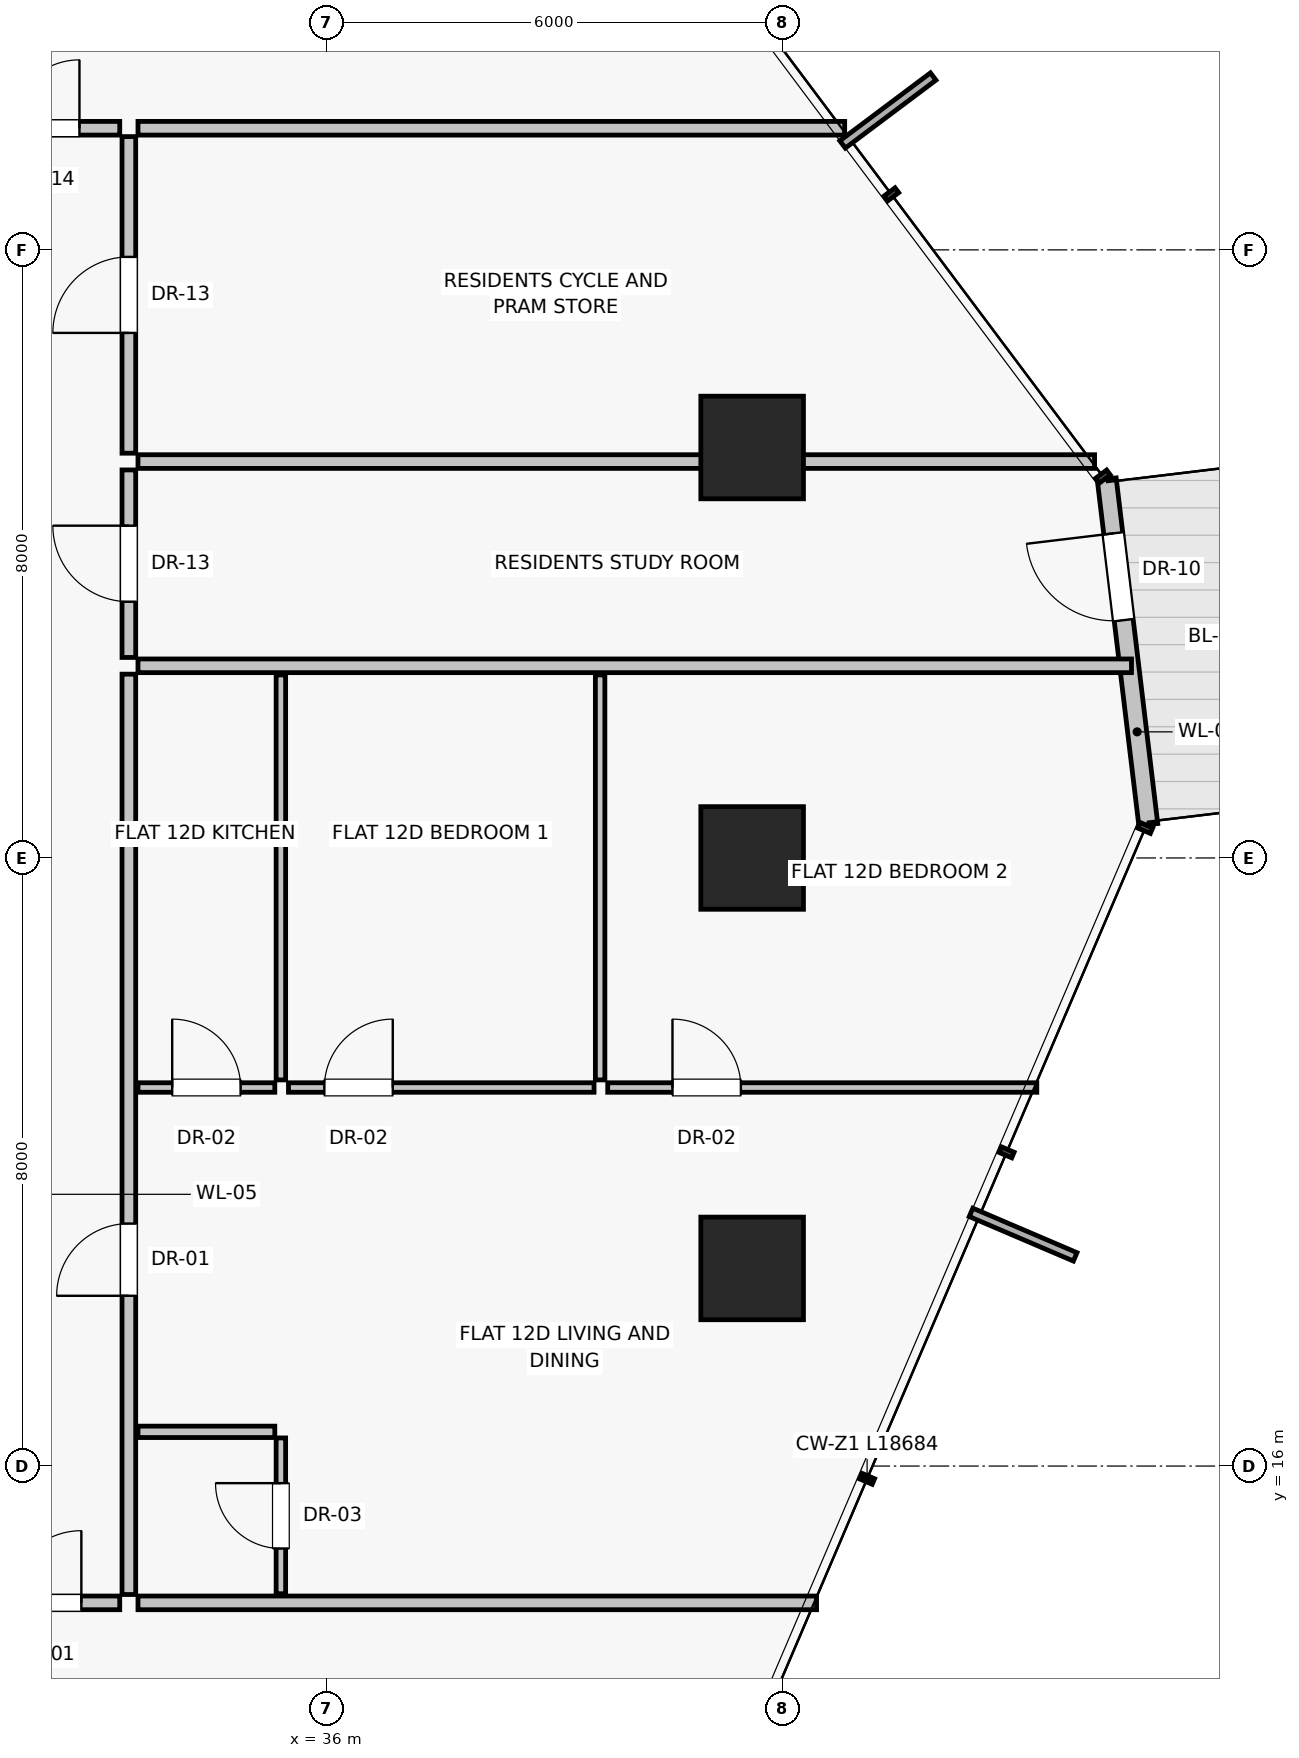
"""IFC4 building model, lengths in metres.
Left out: names, types, materials, properties, quantities, classifications, styles, units other than length and angle.
Written with IfcOpenShell. Run it as: python <this file> out.ifc"""

import sys

from ifc_helpers import new_model, si_unit, direction, frame, frame_2d, origin, origin_2d, place, context, subcontext, project, spatial, rectangle, extrude, source, transform, mapped, element, fill, save


model = new_model("IFC4")
c1 = context("Model", 3, precision=1e-05, world=origin(), true_north=direction((0.0, 1.0)))
c2 = subcontext(c1, "Body", "Model", "MODEL_VIEW")
j1 = project(units=[si_unit("LENGTHUNIT", "METRE"), si_unit("PLANEANGLEUNIT", "RADIAN")], contexts=[c1])
p1 = place(None, origin())
s1 = spatial("IfcSite", under=j1, at=p1, CompositionType="ELEMENT")
p2 = place(p1, origin())
s2 = spatial("IfcBuilding", under=s1, at=p2, CompositionType="ELEMENT")
p3 = place(p2, frame((0.0, 0.0, 46.8)))
s3 = spatial("IfcBuildingStorey", under=s2, at=p3, CompositionType="ELEMENT", Elevation=46.8)
for number, where, z_axis, x_axis in (
    (1, (41.6, 18.6, 0.0), (0.0, 0.0, 1.0), (1.0, 0.0, 0.0)),
    (2, (41.6, 24.0, 0.0), (0.0, 0.0, 1.0), (1.0, 0.0, 0.0)),
    (3, (41.6, 29.4, 0.0), (0.0, 0.0, 1.0), (1.0, 0.0, 0.0)),
):
    element("IfcColumn", number, at=place(p3, frame(where, z_axis=z_axis, x_axis=x_axis)), inside=s3, PredefinedType="COLUMN", context=c2, shape_type="SweptSolid", body=[
        extrude(rectangle(XDim=1.35, YDim=1.35, at=origin_2d()), origin(), (0.0, 0.0, 1.0), 3.25),
    ])
p4 = place(p3, frame((46.812, 24.438, 0.0), z_axis=(0.0, 0.0, 1.0), x_axis=(-0.119460515021, 0.992838952374, 0.0)))
e4 = element("IfcWall", 4, at=p4, inside=s3, PredefinedType="SOLIDWALL", context=c2, shape_type="SweptSolid", body=[
    extrude(rectangle(XDim=4.58, YDim=0.25, at=frame_2d((2.29, 0.0))), origin(), (0.0, 0.0, 1.0), 3.0),
])
p5 = place(p4, frame((2.71, 0.0, 0.0)))
e5 = element("IfcOpeningElement", 5, at=p5, cuts=e4, PredefinedType="OPENING", context=c2, shape_type="SweptSolid", body=[
    extrude(rectangle(XDim=1.15, YDim=2.25, at=frame_2d((0.575, 1.125))), frame((0.0, 0.135, 0.0), z_axis=(0.0, -1.0, 0.0), x_axis=(1.0, 0.0, 0.0)), (0.0, 0.0, 1.0), 0.27),
])
p6 = place(p3, frame((33.52, 14.2, 0.0), z_axis=(0.0, 0.0, 1.0), x_axis=(1.0, 0.0, 0.0)))
e6 = element("IfcWall", 6, at=p6, inside=s3, PredefinedType="PARTITIONING", context=c2, shape_type="SweptSolid", body=[
    extrude(rectangle(XDim=8.927, YDim=0.18, at=frame_2d((4.464, 0.0))), origin(), (0.0, 0.0, 1.0), 3.0),
])
p7 = place(p3, frame((33.52, 33.6, 0.0), z_axis=(0.0, 0.0, 1.0), x_axis=(1.0, 0.0, 0.0)))
e7 = element("IfcWall", 7, at=p7, inside=s3, PredefinedType="PARTITIONING", context=c2, shape_type="SweptSolid", body=[
    extrude(rectangle(XDim=9.297, YDim=0.18, at=frame_2d((4.649, 0.0))), origin(), (0.0, 0.0, 1.0), 3.0),
])
p8 = place(p3, frame((33.4, 14.31, 0.0), z_axis=(0.0, 0.0, 1.0), x_axis=(0.0, 1.0, 0.0)))
e8 = element("IfcWall", 8, at=p8, inside=s3, PredefinedType="PARTITIONING", context=c2, shape_type="SweptSolid", body=[
    extrude(rectangle(XDim=12.108, YDim=0.18, at=frame_2d((6.054, 0.0))), origin(), (0.0, 0.0, 1.0), 3.0),
])
p9 = place(p8, frame((3.93, 0.0, 0.0)))
e9 = element("IfcOpeningElement", 9, at=p9, cuts=e8, PredefinedType="OPENING", context=c2, shape_type="SweptSolid", body=[
    extrude(rectangle(XDim=0.95, YDim=2.02, at=frame_2d((0.475, 1.01))), frame((0.0, 0.1, 0.0), z_axis=(0.0, -1.0, 0.0), x_axis=(1.0, 0.0, 0.0)), (0.0, 0.0, 1.0), 0.2),
])
p10 = place(p3, frame((33.52, 16.45, 0.0), z_axis=(0.0, 0.0, 1.0), x_axis=(1.0, 0.0, 0.0)))
e10 = element("IfcWall", 10, at=p10, inside=s3, PredefinedType="PARTITIONING", context=c2, shape_type="SweptSolid", body=[
    extrude(rectangle(XDim=1.8, YDim=0.15, at=frame_2d((0.9, 0.0))), origin(), (0.0, 0.0, 1.0), 3.0),
])
p11 = place(p3, frame((35.4, 14.32, 0.0), z_axis=(0.0, 0.0, 1.0), x_axis=(0.0, 1.0, 0.0)))
e11 = element("IfcWall", 11, at=p11, inside=s3, PredefinedType="PARTITIONING", context=c2, shape_type="SweptSolid", body=[
    extrude(rectangle(XDim=2.05, YDim=0.125, at=frame_2d((1.025, 0.0))), origin(), (0.0, 0.0, 1.0), 3.0),
])
p12 = place(p11, frame((0.595, 0.0, 0.0)))
e12 = element("IfcOpeningElement", 12, at=p12, cuts=e11, PredefinedType="OPENING", context=c2, shape_type="SweptSolid", body=[
    extrude(rectangle(XDim=0.86, YDim=2.01, at=frame_2d((0.43, 1.005))), frame((0.0, 0.073, 0.0), z_axis=(0.0, -1.0, 0.0), x_axis=(1.0, 0.0, 0.0)), (0.0, 0.0, 1.0), 0.145),
])
p13 = place(p3, frame((33.52, 20.98, 0.0), z_axis=(0.0, 0.0, 1.0), x_axis=(1.0, 0.0, 0.0)))
e13 = element("IfcWall", 13, at=p13, inside=s3, PredefinedType="PARTITIONING", context=c2, shape_type="SweptSolid", body=[
    extrude(rectangle(XDim=1.8, YDim=0.125, at=frame_2d((0.9, 0.0))), origin(), (0.0, 0.0, 1.0), 3.0),
])
p14 = place(p13, frame((0.45, 0.0, 0.0)))
e14 = element("IfcOpeningElement", 14, at=p14, cuts=e13, PredefinedType="OPENING", context=c2, shape_type="SweptSolid", body=[
    extrude(rectangle(XDim=0.9, YDim=2.01, at=frame_2d((0.45, 1.005))), frame((0.0, 0.073, 0.0), z_axis=(0.0, -1.0, 0.0), x_axis=(1.0, 0.0, 0.0)), (0.0, 0.0, 1.0), 0.145),
])
for number, where, z_axis, x_axis in (
    (15, (35.4, 21.08, 0.0), (0.0, 0.0, 1.0), (0.0, 1.0, 0.0)),
    (16, (39.6, 21.08, 0.0), (0.0, 0.0, 1.0), (0.0, 1.0, 0.0)),
):
    element("IfcWall", number, at=place(p3, frame(where, z_axis=z_axis, x_axis=x_axis)), inside=s3, PredefinedType="PARTITIONING", context=c2, shape_type="SweptSolid", body=[
        extrude(rectangle(XDim=5.328, YDim=0.125, at=frame_2d((2.664, 0.0))), origin(), (0.0, 0.0, 1.0), 3.0),
    ])
p15 = place(p3, frame((35.5, 20.98, 0.0), z_axis=(0.0, 0.0, 1.0), x_axis=(1.0, 0.0, 0.0)))
e17 = element("IfcWall", 17, at=p15, inside=s3, PredefinedType="PARTITIONING", context=c2, shape_type="SweptSolid", body=[
    extrude(rectangle(XDim=4.02, YDim=0.125, at=frame_2d((2.01, 0.0))), origin(), (0.0, 0.0, 1.0), 3.0),
])
p16 = place(p15, frame((0.472, 0.0, 0.0)))
e18 = element("IfcOpeningElement", 18, at=p16, cuts=e17, PredefinedType="OPENING", context=c2, shape_type="SweptSolid", body=[
    extrude(rectangle(XDim=0.9, YDim=2.01, at=frame_2d((0.45, 1.005))), frame((0.0, 0.073, 0.0), z_axis=(0.0, -1.0, 0.0), x_axis=(1.0, 0.0, 0.0)), (0.0, 0.0, 1.0), 0.145),
])
p17 = place(p3, frame((39.7, 20.98, 0.0), z_axis=(0.0, 0.0, 1.0), x_axis=(1.0, 0.0, 0.0)))
e19 = element("IfcWall", 19, at=p17, inside=s3, PredefinedType="PARTITIONING", context=c2, shape_type="SweptSolid", body=[
    extrude(rectangle(XDim=5.645, YDim=0.125, at=frame_2d((2.823, 0.0))), origin(), (0.0, 0.0, 1.0), 3.0),
])
p18 = place(p17, frame((0.852, 0.0, 0.0)))
e20 = element("IfcOpeningElement", 20, at=p18, cuts=e19, PredefinedType="OPENING", context=c2, shape_type="SweptSolid", body=[
    extrude(rectangle(XDim=0.9, YDim=2.01, at=frame_2d((0.45, 1.005))), frame((0.0, 0.073, 0.0), z_axis=(0.0, -1.0, 0.0), x_axis=(1.0, 0.0, 0.0)), (0.0, 0.0, 1.0), 0.145),
])
p19 = place(p3, frame((33.52, 26.528, 0.0), z_axis=(0.0, 0.0, 1.0), x_axis=(1.0, 0.0, 0.0)))
e21 = element("IfcWall", 21, at=p19, inside=s3, PredefinedType="PARTITIONING", context=c2, shape_type="SweptSolid", body=[
    extrude(rectangle(XDim=13.071, YDim=0.18, at=frame_2d((6.535, 0.0))), origin(), (0.0, 0.0, 1.0), 3.0),
])
p20 = place(p3, frame((33.4, 26.638, 0.0), z_axis=(0.0, 0.0, 1.0), x_axis=(0.0, 1.0, 0.0)))
e22 = element("IfcWall", 22, at=p20, inside=s3, PredefinedType="PARTITIONING", context=c2, shape_type="SweptSolid", body=[
    extrude(rectangle(XDim=2.467, YDim=0.18, at=frame_2d((1.233, 0.0))), origin(), (0.0, 0.0, 1.0), 3.0),
])
p21 = place(p20, frame((0.733, 0.0, 0.0)))
e23 = element("IfcOpeningElement", 23, at=p21, cuts=e22, PredefinedType="OPENING", context=c2, shape_type="SweptSolid", body=[
    extrude(rectangle(XDim=1.0, YDim=2.01, at=frame_2d((0.5, 1.005))), frame((0.0, 0.1, 0.0), z_axis=(0.0, -1.0, 0.0), x_axis=(1.0, 0.0, 0.0)), (0.0, 0.0, 1.0), 0.2),
])
p22 = place(p3, frame((33.4, 29.325, 0.0), z_axis=(0.0, 0.0, 1.0), x_axis=(0.0, 1.0, 0.0)))
e24 = element("IfcWall", 24, at=p22, inside=s3, PredefinedType="PARTITIONING", context=c2, shape_type="SweptSolid", body=[
    extrude(rectangle(XDim=4.165, YDim=0.18, at=frame_2d((2.083, 0.0))), origin(), (0.0, 0.0, 1.0), 3.0),
])
p23 = place(p22, frame((1.583, 0.0, 0.0)))
e25 = element("IfcOpeningElement", 25, at=p23, cuts=e24, PredefinedType="OPENING", context=c2, shape_type="SweptSolid", body=[
    extrude(rectangle(XDim=1.0, YDim=2.01, at=frame_2d((0.5, 1.005))), frame((0.0, 0.1, 0.0), z_axis=(0.0, -1.0, 0.0), x_axis=(1.0, 0.0, 0.0)), (0.0, 0.0, 1.0), 0.2),
])
p24 = place(p3, frame((33.52, 29.215, 0.0), z_axis=(0.0, 0.0, 1.0), x_axis=(1.0, 0.0, 0.0)))
e26 = element("IfcWall", 26, at=p24, inside=s3, PredefinedType="PARTITIONING", context=c2, shape_type="SweptSolid", body=[
    extrude(rectangle(XDim=12.585, YDim=0.18, at=frame_2d((6.292, 0.0))), origin(), (0.0, 0.0, 1.0), 2.299),
])
p25 = place(p3, frame((31.32, 14.2, 0.0), z_axis=(0.0, 0.0, 1.0), x_axis=(1.0, 0.0, 0.0)))
e27 = element("IfcWall", 27, at=p25, inside=s3, PredefinedType="PARTITIONING", context=c2, shape_type="SweptSolid", body=[
    extrude(rectangle(XDim=1.96, YDim=0.18, at=frame_2d((0.98, 0.0))), origin(), (0.0, 0.0, 1.0), 3.0),
])
p26 = place(p25, frame((0.505, 0.0, 0.0)))
e28 = element("IfcOpeningElement", 28, at=p26, cuts=e27, PredefinedType="OPENING", context=c2, shape_type="SweptSolid", body=[
    extrude(rectangle(XDim=0.95, YDim=2.02, at=frame_2d((0.475, 1.01))), frame((0.0, 0.1, 0.0), z_axis=(0.0, -1.0, 0.0), x_axis=(1.0, 0.0, 0.0)), (0.0, 0.0, 1.0), 0.2),
])
p27 = place(p3, frame((31.32, 33.6, 0.0), z_axis=(0.0, 0.0, 1.0), x_axis=(1.0, 0.0, 0.0)))
e29 = element("IfcWall", 29, at=p27, inside=s3, PredefinedType="PARTITIONING", context=c2, shape_type="SweptSolid", body=[
    extrude(rectangle(XDim=1.96, YDim=0.18, at=frame_2d((0.98, 0.0))), origin(), (0.0, 0.0, 1.0), 3.0),
])
p28 = place(p27, frame((0.53, 0.0, 0.0)))
e30 = element("IfcOpeningElement", 30, at=p28, cuts=e29, PredefinedType="OPENING", context=c2, shape_type="SweptSolid", body=[
    extrude(rectangle(XDim=0.9, YDim=2.01, at=frame_2d((0.45, 1.005))), frame((0.0, 0.1, 0.0), z_axis=(0.0, -1.0, 0.0), x_axis=(1.0, 0.0, 0.0)), (0.0, 0.0, 1.0), 0.2),
])
m1 = source(origin(), c2, "Body", "SweptSolid", [
    extrude(rectangle(XDim=1.15, YDim=2.25, at=frame_2d((0.575, 1.125))), frame((0.0, 0.025, 0.0), z_axis=(0.0, -1.0, 0.0), x_axis=(1.0, 0.0, 0.0)), (0.0, 0.0, 1.0), 0.05),
])
p29 = place(p5, frame((1.15, 0.0, 0.0), z_axis=(0.0, 0.0, 1.0), x_axis=(-1.0, 0.0, 0.0)))
e31 = element("IfcDoor", 31, at=p29, inside=s3, OperationType="SINGLE_SWING_RIGHT", PredefinedType="DOOR", context=c2, shape_type="MappedRepresentation", body=[
    mapped(m1, transform((0.0, 0.0, 0.0), scale=1.0)),
])
fill(e5, e31)
m2 = source(origin(), c2, "Body", "SweptSolid", [
    extrude(rectangle(XDim=0.95, YDim=2.02, at=frame_2d((0.475, 1.01))), frame((0.0, 0.025, 0.0), z_axis=(0.0, -1.0, 0.0), x_axis=(1.0, 0.0, 0.0)), (0.0, 0.0, 1.0), 0.05),
])
p30 = place(p9, origin())
e32 = element("IfcDoor", 32, at=p30, inside=s3, OperationType="SINGLE_SWING_LEFT", PredefinedType="DOOR", context=c2, shape_type="MappedRepresentation", body=[
    mapped(m2, transform((0.0, 0.0, 0.0), scale=1.0)),
])
fill(e9, e32)
m3 = source(origin(), c2, "Body", "SweptSolid", [
    extrude(rectangle(XDim=0.86, YDim=2.01, at=frame_2d((0.43, 1.005))), frame((0.0, 0.025, 0.0), z_axis=(0.0, -1.0, 0.0), x_axis=(1.0, 0.0, 0.0)), (0.0, 0.0, 1.0), 0.05),
])
p31 = place(p12, origin())
e33 = element("IfcDoor", 33, at=p31, inside=s3, OperationType="SINGLE_SWING_RIGHT", PredefinedType="DOOR", context=c2, shape_type="MappedRepresentation", body=[
    mapped(m3, transform((0.0, 0.0, 0.0), scale=1.0)),
])
fill(e12, e33)
m4 = source(origin(), c2, "Body", "SweptSolid", [
    extrude(rectangle(XDim=0.9, YDim=2.01, at=frame_2d((0.45, 1.005))), frame((0.0, 0.025, 0.0), z_axis=(0.0, -1.0, 0.0), x_axis=(1.0, 0.0, 0.0)), (0.0, 0.0, 1.0), 0.05),
])
p32 = place(p14, origin())
e34 = element("IfcDoor", 34, at=p32, inside=s3, OperationType="SINGLE_SWING_LEFT", PredefinedType="DOOR", context=c2, shape_type="MappedRepresentation", body=[
    mapped(m4, transform((0.0, 0.0, 0.0), scale=1.0)),
])
fill(e14, e34)
p33 = place(p16, origin())
e35 = element("IfcDoor", 35, at=p33, inside=s3, OperationType="SINGLE_SWING_RIGHT", PredefinedType="DOOR", context=c2, shape_type="MappedRepresentation", body=[
    mapped(m4, transform((0.0, 0.0, 0.0), scale=1.0)),
])
fill(e18, e35)
p34 = place(p18, origin())
e36 = element("IfcDoor", 36, at=p34, inside=s3, OperationType="SINGLE_SWING_LEFT", PredefinedType="DOOR", context=c2, shape_type="MappedRepresentation", body=[
    mapped(m4, transform((0.0, 0.0, 0.0), scale=1.0)),
])
fill(e20, e36)
m5 = source(origin(), c2, "Body", "SweptSolid", [
    extrude(rectangle(XDim=1.0, YDim=2.01, at=frame_2d((0.5, 1.005))), frame((0.0, 0.025, 0.0), z_axis=(0.0, -1.0, 0.0), x_axis=(1.0, 0.0, 0.0)), (0.0, 0.0, 1.0), 0.05),
])
p35 = place(p21, origin())
e37 = element("IfcDoor", 37, at=p35, inside=s3, OperationType="SINGLE_SWING_RIGHT", PredefinedType="DOOR", context=c2, shape_type="MappedRepresentation", body=[
    mapped(m5, transform((0.0, 0.0, 0.0), scale=1.0)),
])
fill(e23, e37)
p36 = place(p23, origin())
e38 = element("IfcDoor", 38, at=p36, inside=s3, OperationType="SINGLE_SWING_LEFT", PredefinedType="DOOR", context=c2, shape_type="MappedRepresentation", body=[
    mapped(m5, transform((0.0, 0.0, 0.0), scale=1.0)),
])
fill(e25, e38)
p37 = place(p26, origin())
e39 = element("IfcDoor", 39, at=p37, inside=s3, OperationType="SINGLE_SWING_RIGHT", PredefinedType="DOOR", context=c2, shape_type="MappedRepresentation", body=[
    mapped(m2, transform((0.0, 0.0, 0.0), scale=1.0)),
])
fill(e28, e39)
p38 = place(p28, origin())
e40 = element("IfcDoor", 40, at=p38, inside=s3, OperationType="SINGLE_SWING_RIGHT", PredefinedType="DOOR", context=c2, shape_type="MappedRepresentation", body=[
    mapped(m4, transform((0.0, 0.0, 0.0), scale=1.0)),
])
fill(e30, e40)
save(model, sys.argv[1])
